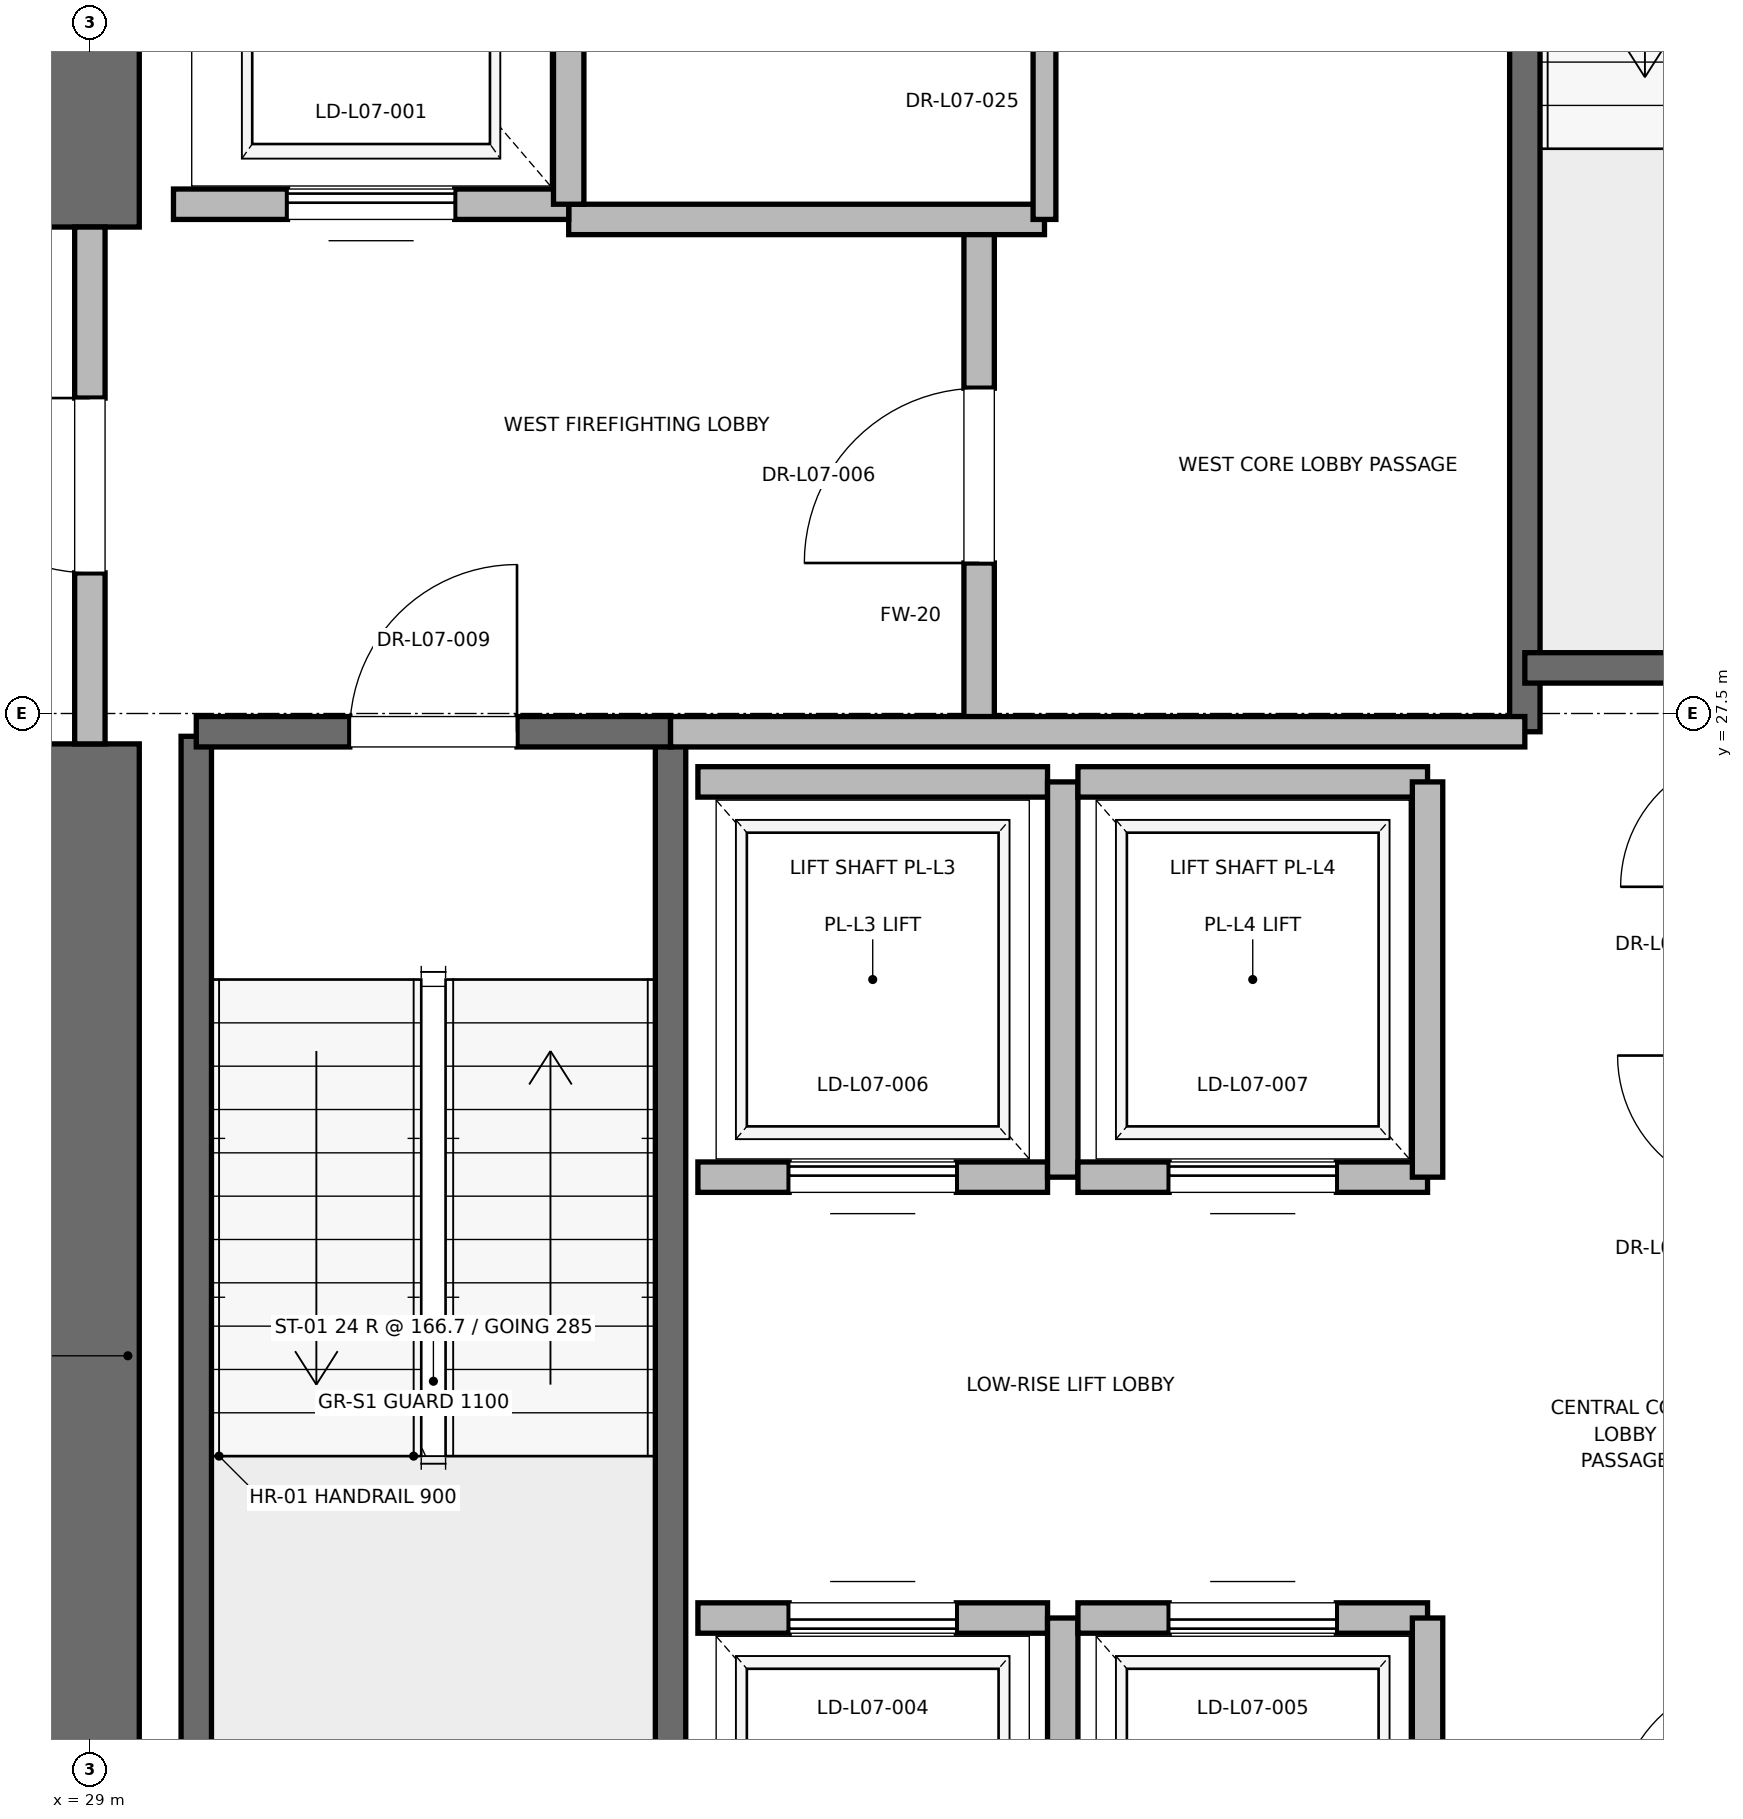
"""IFC4 building model, lengths in metres.
Left out: names, types, materials, properties, quantities, classifications, styles, units other than length and angle.
Written with IfcOpenShell. Run it as: python <this file> out.ifc"""

import sys

from ifc_helpers import new_model, si_unit, direction, frame, frame_2d, origin, place, context, subcontext, project, spatial, rectangle, extrude, element, fill, save


model = new_model("IFC4")
c1 = context("Model", 3, precision=1e-05, world=origin(), true_north=direction((0.0, 1.0)))
c2 = subcontext(c1, "Body", "Model", "MODEL_VIEW")
j1 = project(units=[si_unit("LENGTHUNIT", "METRE"), si_unit("PLANEANGLEUNIT", "RADIAN")], contexts=[c1])
p1 = place(None, origin())
s1 = spatial("IfcSite", under=j1, at=p1, CompositionType="ELEMENT")
p2 = place(p1, origin())
s2 = spatial("IfcBuilding", under=s1, at=p2, CompositionType="ELEMENT")
p3 = place(p2, frame((0.0, 0.0, 35.6)))
s3 = spatial("IfcBuildingStorey", under=s2, at=p3, CompositionType="ELEMENT", Elevation=35.6)
p4 = place(p3, frame((29.0, 18.5, 0.0), z_axis=(0.0, 0.0, 1.0), x_axis=(0.0, 1.0, 0.0)))
e1 = element("IfcWall", 1, at=p4, inside=s3, PredefinedType="SHEAR", context=c2, shape_type="SweptSolid", body=[
    extrude(rectangle(XDim=8.8, YDim=0.65, at=frame_2d((4.4, 0.0))), origin(), (0.0, 0.0, 1.0), 3.76),
])
p5 = place(p3, frame((29.0, 30.7, 0.0), z_axis=(0.0, 0.0, 1.0), x_axis=(0.0, 1.0, 0.0)))
e2 = element("IfcWall", 2, at=p5, inside=s3, PredefinedType="SHEAR", context=c2, shape_type="SweptSolid", body=[
    extrude(rectangle(XDim=5.8, YDim=0.65, at=frame_2d((2.9, 0.0))), origin(), (0.0, 0.0, 1.0), 3.76),
])
p6 = place(p3, frame((29.7, 19.2, 0.0), z_axis=(0.0, 0.0, 1.0), x_axis=(0.0, 1.0, 0.0)))
e3 = element("IfcWall", 3, at=p6, inside=s3, PredefinedType="SOLIDWALL", context=c2, shape_type="SweptSolid", body=[
    extrude(rectangle(XDim=8.15, YDim=0.2, at=frame_2d((4.075, 0.0))), origin(), (0.0, 0.0, 1.0), 3.76),
])
p7 = place(p3, frame((32.82, 18.6, 0.0), z_axis=(0.0, 0.0, 1.0), x_axis=(0.0, 1.0, 0.0)))
e4 = element("IfcWall", 4, at=p7, inside=s3, PredefinedType="SOLIDWALL", context=c2, shape_type="SweptSolid", body=[
    extrude(rectangle(XDim=8.78, YDim=0.2, at=frame_2d((4.39, 0.0))), origin(), (0.0, 0.0, 1.0), 3.76),
])
p8 = place(p3, frame((29.7, 27.38, 0.0), z_axis=(0.0, 0.0, 1.0), x_axis=(1.0, 0.0, 0.0)))
e5 = element("IfcWall", 5, at=p8, inside=s3, PredefinedType="SOLIDWALL", context=c2, shape_type="SweptSolid", body=[
    extrude(rectangle(XDim=3.12, YDim=0.2, at=frame_2d((1.56, 0.0))), origin(), (0.0, 0.0, 1.0), 3.76),
])
p9 = place(p8, frame((1.01, 0.0, 0.0)))
e6 = element("IfcOpeningElement", 6, at=p9, cuts=e5, PredefinedType="OPENING", context=c2, shape_type="SweptSolid", body=[
    extrude(rectangle(XDim=1.1, YDim=2.15, at=frame_2d((0.55, 1.075))), frame((0.0, 0.1, 0.0), z_axis=(0.0, -1.0, 0.0), x_axis=(1.0, 0.0, 0.0)), (0.0, 0.0, 1.0), 0.2),
])
p10 = place(p3, frame((38.44, 27.38, 0.0), z_axis=(0.0, 0.0, 1.0), x_axis=(0.0, 1.0, 0.0)))
e7 = element("IfcWall", 7, at=p10, inside=s3, PredefinedType="SOLIDWALL", context=c2, shape_type="SweptSolid", body=[
    extrude(rectangle(XDim=8.87, YDim=0.2, at=frame_2d((4.435, 0.0))), origin(), (0.0, 0.0, 1.0), 3.76),
])
p11 = place(p3, frame((38.44, 27.8, 0.0), z_axis=(0.0, 0.0, 1.0), x_axis=(1.0, 0.0, 0.0)))
e8 = element("IfcWall", 8, at=p11, inside=s3, PredefinedType="SOLIDWALL", context=c2, shape_type="SweptSolid", body=[
    extrude(rectangle(XDim=3.32, YDim=0.2, at=frame_2d((1.66, 0.0))), origin(), (0.0, 0.0, 1.0), 3.76),
])
p12 = place(p3, frame((34.85, 27.38, 0.0), z_axis=(0.0, 0.0, 1.0), x_axis=(0.0, 1.0, 0.0)))
e9 = element("IfcWall", 9, at=p12, inside=s3, PredefinedType="PARTITIONING", context=c2, shape_type="SweptSolid", body=[
    extrude(rectangle(XDim=3.37, YDim=0.2, at=frame_2d((1.685, 0.0))), origin(), (0.0, 0.0, 1.0), 3.76),
])
p13 = place(p12, frame((1.11, 0.0, 0.0)))
e10 = element("IfcOpeningElement", 10, at=p13, cuts=e9, PredefinedType="OPENING", context=c2, shape_type="SweptSolid", body=[
    extrude(rectangle(XDim=1.15, YDim=2.2, at=frame_2d((0.575, 1.1))), frame((0.0, 0.1, 0.0), z_axis=(0.0, -1.0, 0.0), x_axis=(1.0, 0.0, 0.0)), (0.0, 0.0, 1.0), 0.2),
])
p14 = place(p3, frame((29.0, 27.3, 0.0), z_axis=(0.0, 0.0, 1.0), x_axis=(0.0, 1.0, 0.0)))
e11 = element("IfcWall", 11, at=p14, inside=s3, PredefinedType="PARTITIONING", context=c2, shape_type="SweptSolid", body=[
    extrude(rectangle(XDim=3.4, YDim=0.2, at=frame_2d((1.7, 0.0))), origin(), (0.0, 0.0, 1.0), 2.54),
])
p15 = place(p14, frame((1.125, 0.0, 0.0)))
e12 = element("IfcOpeningElement", 12, at=p15, cuts=e11, PredefinedType="OPENING", context=c2, shape_type="SweptSolid", body=[
    extrude(rectangle(XDim=1.15, YDim=2.2, at=frame_2d((0.575, 1.1))), frame((0.0, 0.1, 0.0), z_axis=(0.0, -1.0, 0.0), x_axis=(1.0, 0.0, 0.0)), (0.0, 0.0, 1.0), 0.2),
])
p16 = place(p3, frame((32.82, 27.38, 0.0), z_axis=(0.0, 0.0, 1.0), x_axis=(1.0, 0.0, 0.0)))
e13 = element("IfcWall", 13, at=p16, inside=s3, PredefinedType="PARTITIONING", context=c2, shape_type="SweptSolid", body=[
    extrude(rectangle(XDim=5.62, YDim=0.2, at=frame_2d((2.81, 0.0))), origin(), (0.0, 0.0, 1.0), 3.76),
])
p17 = place(p3, frame((32.15, 30.75, 0.0), z_axis=(0.0, 0.0, 1.0), x_axis=(1.0, 0.0, 0.0)))
e14 = element("IfcWall", 14, at=p17, inside=s3, PredefinedType="PARTITIONING", context=c2, shape_type="SweptSolid", body=[
    extrude(rectangle(XDim=3.13, YDim=0.2, at=frame_2d((1.565, 0.0))), origin(), (0.0, 0.0, 1.0), 3.76),
])
p18 = place(p3, frame((29.55, 30.85, 0.0), z_axis=(0.0, 0.0, 1.0), x_axis=(1.0, 0.0, 0.0)))
e15 = element("IfcWall", 15, at=p18, inside=s3, PredefinedType="SOLIDWALL", context=c2, shape_type="SweptSolid", body=[
    extrude(rectangle(XDim=2.6, YDim=0.2, at=frame_2d((1.3, 0.0))), origin(), (0.0, 0.0, 1.0), 2.54),
])
p19 = place(p18, frame((0.75, 0.0, 0.0)))
e16 = element("IfcOpeningElement", 16, at=p19, cuts=e15, PredefinedType="OPENING", context=c2, shape_type="SweptSolid", body=[
    extrude(rectangle(XDim=1.1, YDim=2.2, at=frame_2d((0.55, 1.1))), frame((0.0, 0.1, 0.0), z_axis=(0.0, -1.0, 0.0), x_axis=(1.0, 0.0, 0.0)), (0.0, 0.0, 1.0), 0.2),
])
p20 = place(p3, frame((32.15, 30.85, 0.0), z_axis=(0.0, 0.0, 1.0), x_axis=(0.0, 1.0, 0.0)))
e17 = element("IfcWall", 17, at=p20, inside=s3, PredefinedType="SOLIDWALL", context=c2, shape_type="SweptSolid", body=[
    extrude(rectangle(XDim=3.0, YDim=0.2, at=frame_2d((1.5, 0.0))), origin(), (0.0, 0.0, 1.0), 3.76),
])
p21 = place(p3, frame((35.3, 21.55, 0.0), z_axis=(0.0, 0.0, 1.0), x_axis=(-1.0, 0.0, 0.0)))
e18 = element("IfcWall", 18, at=p21, inside=s3, PredefinedType="SOLIDWALL", context=c2, shape_type="SweptSolid", body=[
    extrude(rectangle(XDim=2.3, YDim=0.2, at=frame_2d((1.15, 0.0))), origin(), (0.0, 0.0, 1.0), 3.76),
])
p22 = place(p21, frame((0.6, 0.0, 0.0)))
e19 = element("IfcOpeningElement", 19, at=p22, cuts=e18, PredefinedType="OPENING", context=c2, shape_type="SweptSolid", body=[
    extrude(rectangle(XDim=1.1, YDim=2.2, at=frame_2d((0.55, 1.1))), frame((0.0, 0.1, 0.0), z_axis=(0.0, -1.0, 0.0), x_axis=(1.0, 0.0, 0.0)), (0.0, 0.0, 1.0), 0.2),
])
p23 = place(p3, frame((35.4, 18.95, 0.0), z_axis=(0.0, 0.0, 1.0), x_axis=(0.0, 1.0, 0.0)))
e20 = element("IfcWall", 20, at=p23, inside=s3, PredefinedType="SOLIDWALL", context=c2, shape_type="SweptSolid", body=[
    extrude(rectangle(XDim=2.6, YDim=0.2, at=frame_2d((1.3, 0.0))), origin(), (0.0, 0.0, 1.0), 3.76),
])
p24 = place(p3, frame((37.8, 21.55, 0.0), z_axis=(0.0, 0.0, 1.0), x_axis=(-1.0, 0.0, 0.0)))
e21 = element("IfcWall", 21, at=p24, inside=s3, PredefinedType="SOLIDWALL", context=c2, shape_type="SweptSolid", body=[
    extrude(rectangle(XDim=2.3, YDim=0.2, at=frame_2d((1.15, 0.0))), origin(), (0.0, 0.0, 1.0), 3.76),
])
p25 = place(p24, frame((0.6, 0.0, 0.0)))
e22 = element("IfcOpeningElement", 22, at=p25, cuts=e21, PredefinedType="OPENING", context=c2, shape_type="SweptSolid", body=[
    extrude(rectangle(XDim=1.1, YDim=2.2, at=frame_2d((0.55, 1.1))), frame((0.0, 0.1, 0.0), z_axis=(0.0, -1.0, 0.0), x_axis=(1.0, 0.0, 0.0)), (0.0, 0.0, 1.0), 0.2),
])
p26 = place(p3, frame((37.8, 18.95, 0.0), z_axis=(0.0, 0.0, 1.0), x_axis=(0.0, 1.0, 0.0)))
e23 = element("IfcWall", 23, at=p26, inside=s3, PredefinedType="SOLIDWALL", context=c2, shape_type="SweptSolid", body=[
    extrude(rectangle(XDim=2.6, YDim=0.2, at=frame_2d((1.3, 0.0))), origin(), (0.0, 0.0, 1.0), 2.54),
])
p27 = place(p3, frame((33.0, 24.45, 0.0), z_axis=(0.0, 0.0, 1.0), x_axis=(1.0, 0.0, 0.0)))
e24 = element("IfcWall", 24, at=p27, inside=s3, PredefinedType="SOLIDWALL", context=c2, shape_type="SweptSolid", body=[
    extrude(rectangle(XDim=2.3, YDim=0.2, at=frame_2d((1.15, 0.0))), origin(), (0.0, 0.0, 1.0), 3.76),
])
p28 = place(p27, frame((0.6, 0.0, 0.0)))
e25 = element("IfcOpeningElement", 25, at=p28, cuts=e24, PredefinedType="OPENING", context=c2, shape_type="SweptSolid", body=[
    extrude(rectangle(XDim=1.1, YDim=2.2, at=frame_2d((0.55, 1.1))), frame((0.0, 0.1, 0.0), z_axis=(0.0, -1.0, 0.0), x_axis=(1.0, 0.0, 0.0)), (0.0, 0.0, 1.0), 0.2),
])
p29 = place(p3, frame((35.3, 27.05, 0.0), z_axis=(0.0, 0.0, 1.0), x_axis=(-1.0, 0.0, 0.0)))
e26 = element("IfcWall", 26, at=p29, inside=s3, PredefinedType="SOLIDWALL", context=c2, shape_type="SweptSolid", body=[
    extrude(rectangle(XDim=2.3, YDim=0.2, at=frame_2d((1.15, 0.0))), origin(), (0.0, 0.0, 1.0), 3.76),
])
p30 = place(p3, frame((35.4, 24.45, 0.0), z_axis=(0.0, 0.0, 1.0), x_axis=(0.0, 1.0, 0.0)))
e27 = element("IfcWall", 27, at=p30, inside=s3, PredefinedType="SOLIDWALL", context=c2, shape_type="SweptSolid", body=[
    extrude(rectangle(XDim=2.6, YDim=0.2, at=frame_2d((1.3, 0.0))), origin(), (0.0, 0.0, 1.0), 3.76),
])
p31 = place(p3, frame((35.5, 24.45, 0.0), z_axis=(0.0, 0.0, 1.0), x_axis=(1.0, 0.0, 0.0)))
e28 = element("IfcWall", 28, at=p31, inside=s3, PredefinedType="SOLIDWALL", context=c2, shape_type="SweptSolid", body=[
    extrude(rectangle(XDim=2.3, YDim=0.2, at=frame_2d((1.15, 0.0))), origin(), (0.0, 0.0, 1.0), 3.76),
])
p32 = place(p31, frame((0.6, 0.0, 0.0)))
e29 = element("IfcOpeningElement", 29, at=p32, cuts=e28, PredefinedType="OPENING", context=c2, shape_type="SweptSolid", body=[
    extrude(rectangle(XDim=1.1, YDim=2.2, at=frame_2d((0.55, 1.1))), frame((0.0, 0.1, 0.0), z_axis=(0.0, -1.0, 0.0), x_axis=(1.0, 0.0, 0.0)), (0.0, 0.0, 1.0), 0.2),
])
p33 = place(p3, frame((37.8, 27.05, 0.0), z_axis=(0.0, 0.0, 1.0), x_axis=(-1.0, 0.0, 0.0)))
e30 = element("IfcWall", 30, at=p33, inside=s3, PredefinedType="SOLIDWALL", context=c2, shape_type="SweptSolid", body=[
    extrude(rectangle(XDim=2.3, YDim=0.2, at=frame_2d((1.15, 0.0))), origin(), (0.0, 0.0, 1.0), 3.76),
])
p34 = place(p3, frame((37.8, 24.45, 0.0), z_axis=(0.0, 0.0, 1.0), x_axis=(0.0, 1.0, 0.0)))
e31 = element("IfcWall", 31, at=p34, inside=s3, PredefinedType="SOLIDWALL", context=c2, shape_type="SweptSolid", body=[
    extrude(rectangle(XDim=2.6, YDim=0.2, at=frame_2d((1.3, 0.0))), origin(), (0.0, 0.0, 1.0), 3.76),
])
p35 = place(p3, frame((35.28, 30.75, 0.0), z_axis=(0.0, 0.0, 1.0), x_axis=(0.0, 1.0, 0.0)))
e32 = element("IfcWall", 32, at=p35, inside=s3, PredefinedType="PARTITIONING", context=c2, shape_type="SweptSolid", body=[
    extrude(rectangle(XDim=3.2, YDim=0.15, at=frame_2d((1.6, 0.0))), origin(), (0.0, 0.0, 1.0), 2.85),
])
p36 = place(p35, frame((1.15, 0.0, 0.0)))
e33 = element("IfcOpeningElement", 33, at=p36, cuts=e32, PredefinedType="OPENING", context=c2, shape_type="SweptSolid", body=[
    extrude(rectangle(XDim=0.9, YDim=2.1, at=frame_2d((0.45, 1.05))), frame((0.0, 0.075, 0.0), z_axis=(0.0, -1.0, 0.0), x_axis=(1.0, 0.0, 0.0)), (0.0, 0.0, 1.0), 0.15),
])
p37 = place(p9, origin())
e34 = element("IfcDoor", 34, at=p37, inside=s3, OperationType="SINGLE_SWING_RIGHT", PredefinedType="DOOR", context=c2, shape_type="SweptSolid", body=[
    extrude(rectangle(XDim=1.1, YDim=2.15, at=frame_2d((0.55, 1.075))), frame((0.0, 0.025, 0.0), z_axis=(0.0, -1.0, 0.0), x_axis=(1.0, 0.0, 0.0)), (0.0, 0.0, 1.0), 0.05),
])
fill(e6, e34)
p38 = place(p13, origin())
e35 = element("IfcDoor", 35, at=p38, inside=s3, OperationType="SINGLE_SWING_LEFT", PredefinedType="DOOR", context=c2, shape_type="SweptSolid", body=[
    extrude(rectangle(XDim=1.15, YDim=2.2, at=frame_2d((0.575, 1.1))), frame((0.0, 0.025, 0.0), z_axis=(0.0, -1.0, 0.0), x_axis=(1.0, 0.0, 0.0)), (0.0, 0.0, 1.0), 0.05),
])
fill(e10, e35)
p39 = place(p15, origin())
e36 = element("IfcDoor", 36, at=p39, inside=s3, OperationType="SINGLE_SWING_RIGHT", PredefinedType="DOOR", context=c2, shape_type="SweptSolid", body=[
    extrude(rectangle(XDim=1.15, YDim=2.2, at=frame_2d((0.575, 1.1))), frame((0.0, 0.025, 0.0), z_axis=(0.0, -1.0, 0.0), x_axis=(1.0, 0.0, 0.0)), (0.0, 0.0, 1.0), 0.05),
])
fill(e12, e36)
p40 = place(p19, origin())
e37 = element("IfcDoor", 37, at=p40, inside=s3, OperationType="SLIDING_TO_RIGHT", PredefinedType="DOOR", context=c2, shape_type="SweptSolid", body=[
    extrude(rectangle(XDim=1.1, YDim=2.2, at=frame_2d((0.55, 1.1))), frame((0.0, 0.025, 0.0), z_axis=(0.0, -1.0, 0.0), x_axis=(1.0, 0.0, 0.0)), (0.0, 0.0, 1.0), 0.05),
])
fill(e16, e37)
p41 = place(p22, origin())
e38 = element("IfcDoor", 38, at=p41, inside=s3, OperationType="SLIDING_TO_RIGHT", PredefinedType="DOOR", context=c2, shape_type="SweptSolid", body=[
    extrude(rectangle(XDim=1.1, YDim=2.2, at=frame_2d((0.55, 1.1))), frame((0.0, 0.025, 0.0), z_axis=(0.0, -1.0, 0.0), x_axis=(1.0, 0.0, 0.0)), (0.0, 0.0, 1.0), 0.05),
])
fill(e19, e38)
p42 = place(p25, origin())
e39 = element("IfcDoor", 39, at=p42, inside=s3, OperationType="SLIDING_TO_RIGHT", PredefinedType="DOOR", context=c2, shape_type="SweptSolid", body=[
    extrude(rectangle(XDim=1.1, YDim=2.2, at=frame_2d((0.55, 1.1))), frame((0.0, 0.025, 0.0), z_axis=(0.0, -1.0, 0.0), x_axis=(1.0, 0.0, 0.0)), (0.0, 0.0, 1.0), 0.05),
])
fill(e22, e39)
p43 = place(p28, origin())
e40 = element("IfcDoor", 40, at=p43, inside=s3, OperationType="SLIDING_TO_RIGHT", PredefinedType="DOOR", context=c2, shape_type="SweptSolid", body=[
    extrude(rectangle(XDim=1.1, YDim=2.2, at=frame_2d((0.55, 1.1))), frame((0.0, 0.025, 0.0), z_axis=(0.0, -1.0, 0.0), x_axis=(1.0, 0.0, 0.0)), (0.0, 0.0, 1.0), 0.05),
])
fill(e25, e40)
p44 = place(p32, origin())
e41 = element("IfcDoor", 41, at=p44, inside=s3, OperationType="SLIDING_TO_RIGHT", PredefinedType="DOOR", context=c2, shape_type="SweptSolid", body=[
    extrude(rectangle(XDim=1.1, YDim=2.2, at=frame_2d((0.55, 1.1))), frame((0.0, 0.025, 0.0), z_axis=(0.0, -1.0, 0.0), x_axis=(1.0, 0.0, 0.0)), (0.0, 0.0, 1.0), 0.05),
])
fill(e29, e41)
save(model, sys.argv[1])
